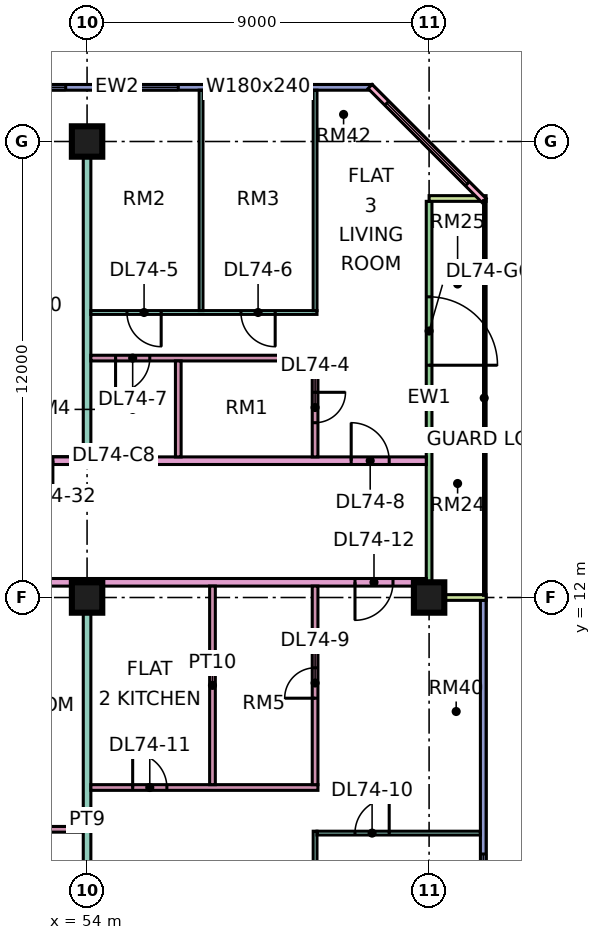
"""IFC4 building model, lengths in metres.
Left out: names, types, materials, properties, quantities, classifications, styles, units other than length and angle.
Written with IfcOpenShell. Run it as: python <this file> out.ifc"""

import sys

from ifc_helpers import new_model, si_unit, direction, frame, frame_2d, origin, origin_2d, place, context, subcontext, project, spatial, rectangle, extrude, element, fill, save


model = new_model("IFC4")
c1 = context("Model", 3, precision=1e-05, world=origin(), true_north=direction((0.0, 1.0)))
c2 = subcontext(c1, "Body", "Model", "MODEL_VIEW")
j1 = project(units=[si_unit("LENGTHUNIT", "METRE"), si_unit("PLANEANGLEUNIT", "RADIAN")], contexts=[c1])
p1 = place(None, origin())
s1 = spatial("IfcSite", under=j1, at=p1, CompositionType="ELEMENT")
p2 = place(p1, origin())
s2 = spatial("IfcBuilding", under=s1, at=p2, CompositionType="ELEMENT")
p3 = place(p2, frame((0.0, 0.0, 314.65)))
s3 = spatial("IfcBuildingStorey", under=s2, at=p3, CompositionType="ELEMENT", Elevation=314.65)
for number, where, z_axis, x_axis in (
    (1, (54.0, 12.0, 0.0), (0.0, 0.0, 1.0), (1.0, 0.0, 0.0)),
    (2, (54.0, 24.0, 0.0), (0.0, 0.0, 1.0), (1.0, 0.0, 0.0)),
    (3, (63.0, 12.0, 0.0), (0.0, 0.0, 1.0), (1.0, 0.0, 0.0)),
):
    element("IfcColumn", number, at=place(p3, frame(where, z_axis=z_axis, x_axis=x_axis)), inside=s3, PredefinedType="COLUMN", context=c2, shape_type="SweptSolid", body=[
        extrude(rectangle(XDim=0.8, YDim=0.8, at=origin_2d()), origin(), (0.0, 0.0, 1.0), 3.75),
    ])
p4 = place(p3, frame((61.5, 25.425, 0.0), z_axis=(0.0, 0.0, 1.0), x_axis=(-1.0, 0.0, 0.0)))
e4 = element("IfcWall", 4, at=p4, inside=s3, PredefinedType="SOLIDWALL", context=c2, shape_type="SweptSolid", body=[
    extrude(rectangle(XDim=13.425, YDim=0.15, at=frame_2d((6.712, 0.0))), origin(), (0.0, 0.0, 1.0), 3.35),
])
p5 = place(p4, frame((2.1, 0.0, 0.45)))
e5 = element("IfcOpeningElement", 5, at=p5, cuts=e4, PredefinedType="OPENING", context=c2, shape_type="SweptSolid", body=[
    extrude(rectangle(XDim=1.8, YDim=2.4, at=frame_2d((0.9, 1.2))), frame((0.0, 0.085, 0.0), z_axis=(0.0, -1.0, 0.0), x_axis=(1.0, 0.0, 0.0)), (0.0, 0.0, 1.0), 0.17),
])
p6 = place(p4, frame((5.1, 0.0, 0.45)))
e6 = element("IfcOpeningElement", 6, at=p6, cuts=e4, PredefinedType="OPENING", context=c2, shape_type="SweptSolid", body=[
    extrude(rectangle(XDim=1.8, YDim=2.4, at=frame_2d((0.9, 1.2))), frame((0.0, 0.085, 0.0), z_axis=(0.0, -1.0, 0.0), x_axis=(1.0, 0.0, 0.0)), (0.0, 0.0, 1.0), 0.17),
])
p7 = place(p4, frame((8.062, 0.0, 0.45)))
e7 = element("IfcOpeningElement", 7, at=p7, cuts=e4, PredefinedType="OPENING", context=c2, shape_type="SweptSolid", body=[
    extrude(rectangle(XDim=4.8, YDim=2.4, at=frame_2d((2.4, 1.2))), frame((0.0, 0.085, 0.0), z_axis=(0.0, -1.0, 0.0), x_axis=(1.0, 0.0, 0.0)), (0.0, 0.0, 1.0), 0.17),
])
p8 = place(p3, frame((64.425, 1.5, 0.0), z_axis=(0.0, 0.0, 1.0), x_axis=(0.0, 1.0, 0.0)))
e8 = element("IfcWall", 8, at=p8, inside=s3, PredefinedType="SOLIDWALL", context=c2, shape_type="SweptSolid", body=[
    extrude(rectangle(XDim=10.425, YDim=0.15, at=frame_2d((5.212, 0.0))), origin(), (0.0, 0.0, 1.0), 3.35),
])
p9 = place(p8, frame((0.75, 0.0, 0.45)))
e9 = element("IfcOpeningElement", 9, at=p9, cuts=e8, PredefinedType="OPENING", context=c2, shape_type="SweptSolid", body=[
    extrude(rectangle(XDim=3.0, YDim=2.4, at=frame_2d((1.5, 1.2))), frame((0.0, 0.085, 0.0), z_axis=(0.0, -1.0, 0.0), x_axis=(1.0, 0.0, 0.0)), (0.0, 0.0, 1.0), 0.17),
])
p10 = place(p3, frame((63.0, 12.075, 0.0), z_axis=(0.0, 0.0, 1.0), x_axis=(0.0, 1.0, 0.0)))
e10 = element("IfcWall", 10, at=p10, inside=s3, PredefinedType="SOLIDWALL", context=c2, shape_type="SweptSolid", body=[
    extrude(rectangle(XDim=10.35, YDim=0.15, at=frame_2d((5.175, 0.0))), origin(), (0.0, 0.0, 1.0), 3.35),
])
p11 = place(p10, frame((6.038, 0.0, 0.0)))
e11 = element("IfcOpeningElement", 11, at=p11, cuts=e10, PredefinedType="OPENING", context=c2, shape_type="SweptSolid", body=[
    extrude(rectangle(XDim=1.8, YDim=2.4, at=frame_2d((0.9, 1.2))), frame((0.0, 0.085, 0.0), z_axis=(0.0, -1.0, 0.0), x_axis=(1.0, 0.0, 0.0)), (0.0, 0.0, 1.0), 0.17),
])
for number, where, z_axis, x_axis in (
    (12, (64.5, 12.0, 0.0), (0.0, 0.0, 1.0), (-1.0, 0.0, 0.0)),
    (13, (64.5, 22.5, 0.0), (0.0, 0.0, 1.0), (-1.0, 0.0, 0.0)),
):
    element("IfcWall", number, at=place(p3, frame(where, z_axis=z_axis, x_axis=x_axis)), inside=s3, PredefinedType="SOLIDWALL", context=c2, shape_type="SweptSolid", body=[
        extrude(rectangle(XDim=1.5, YDim=0.15, at=frame_2d((0.75, 0.0))), origin(), (0.0, 0.0, 1.0), 3.35),
    ])
p12 = place(p3, frame((64.447, 22.447, 0.0), z_axis=(0.0, 0.0, 1.0), x_axis=(-0.707106781187, 0.707106781187, 0.0)))
e14 = element("IfcWall", 14, at=p12, inside=s3, PredefinedType="SOLIDWALL", context=c2, shape_type="SweptSolid", body=[
    extrude(rectangle(XDim=4.243, YDim=0.15, at=frame_2d((2.121, 0.0))), origin(), (0.0, 0.0, 1.0), 3.35),
])
p13 = place(p12, frame((0.621, 0.0, 0.45)))
e15 = element("IfcOpeningElement", 15, at=p13, cuts=e14, PredefinedType="OPENING", context=c2, shape_type="SweptSolid", body=[
    extrude(rectangle(XDim=3.0, YDim=2.4, at=frame_2d((1.5, 1.2))), frame((0.0, 0.085, 0.0), z_axis=(0.0, -1.0, 0.0), x_axis=(1.0, 0.0, 0.0)), (0.0, 0.0, 1.0), 0.17),
])
p14 = place(p3, frame((40.65, 12.4, 0.0), z_axis=(0.0, 0.0, 1.0), x_axis=(1.0, 0.0, 0.0)))
e16 = element("IfcWall", 16, at=p14, inside=s3, PredefinedType="PARTITIONING", context=c2, shape_type="SweptSolid", body=[
    extrude(rectangle(XDim=22.276, YDim=0.2, at=frame_2d((11.138, 0.0))), origin(), (0.0, 0.0, 1.0), 3.35),
])
p15 = place(p14, frame((20.4, 0.0, 0.0)))
e17 = element("IfcOpeningElement", 17, at=p15, cuts=e16, PredefinedType="OPENING", context=c2, shape_type="SweptSolid", body=[
    extrude(rectangle(XDim=1.0, YDim=2.1, at=frame_2d((0.5, 1.05))), frame((0.0, 0.11, 0.0), z_axis=(0.0, -1.0, 0.0), x_axis=(1.0, 0.0, 0.0)), (0.0, 0.0, 1.0), 0.22),
])
p16 = place(p14, frame((1.05, 0.0, 0.0)))
e18 = element("IfcOpeningElement", 18, at=p16, cuts=e16, PredefinedType="OPENING", context=c2, shape_type="SweptSolid", body=[
    extrude(rectangle(XDim=1.0, YDim=2.1, at=frame_2d((0.5, 1.05))), frame((0.0, 0.11, 0.0), z_axis=(0.0, -1.0, 0.0), x_axis=(1.0, 0.0, 0.0)), (0.0, 0.0, 1.0), 0.22),
])
p17 = place(p3, frame((43.575, 5.9, 0.0), z_axis=(0.0, 0.0, 1.0), x_axis=(1.0, 0.0, 0.0)))
e19 = element("IfcWall", 19, at=p17, inside=s3, PredefinedType="PARTITIONING", context=c2, shape_type="SweptSolid", body=[
    extrude(rectangle(XDim=10.325, YDim=0.15, at=frame_2d((5.163, 0.0))), origin(), (0.0, 0.0, 1.0), 3.35),
])
p18 = place(p17, frame((1.825, 0.0, 0.0)))
e20 = element("IfcOpeningElement", 20, at=p18, cuts=e19, PredefinedType="OPENING", context=c2, shape_type="SweptSolid", body=[
    extrude(rectangle(XDim=0.8, YDim=2.1, at=frame_2d((0.4, 1.05))), frame((0.0, 0.085, 0.0), z_axis=(0.0, -1.0, 0.0), x_axis=(1.0, 0.0, 0.0)), (0.0, 0.0, 1.0), 0.17),
])
p19 = place(p17, frame((6.975, 0.0, 0.0)))
e21 = element("IfcOpeningElement", 21, at=p19, cuts=e19, PredefinedType="OPENING", context=c2, shape_type="SweptSolid", body=[
    extrude(rectangle(XDim=0.9, YDim=2.1, at=frame_2d((0.45, 1.05))), frame((0.0, 0.085, 0.0), z_axis=(0.0, -1.0, 0.0), x_axis=(1.0, 0.0, 0.0)), (0.0, 0.0, 1.0), 0.17),
])
p20 = place(p3, frame((51.225, 15.6, 0.0), z_axis=(0.0, 0.0, 1.0), x_axis=(1.0, 0.0, 0.0)))
e22 = element("IfcWall", 22, at=p20, inside=s3, PredefinedType="PARTITIONING", context=c2, shape_type="SweptSolid", body=[
    extrude(rectangle(XDim=11.701, YDim=0.2, at=frame_2d((5.851, 0.0))), origin(), (0.0, 0.0, 1.0), 3.35),
])
p21 = place(p20, frame((9.725, 0.0, 0.0)))
e23 = element("IfcOpeningElement", 23, at=p21, cuts=e22, PredefinedType="OPENING", context=c2, shape_type="SweptSolid", body=[
    extrude(rectangle(XDim=1.0, YDim=2.1, at=frame_2d((0.5, 1.05))), frame((0.0, 0.11, 0.0), z_axis=(0.0, -1.0, 0.0), x_axis=(1.0, 0.0, 0.0)), (0.0, 0.0, 1.0), 0.22),
])
p22 = place(p20, frame((0.875, 0.0, 0.0)))
e24 = element("IfcOpeningElement", 24, at=p22, cuts=e22, PredefinedType="OPENING", context=c2, shape_type="SweptSolid", body=[
    extrude(rectangle(XDim=1.0, YDim=2.1, at=frame_2d((0.5, 1.05))), frame((0.0, 0.11, 0.0), z_axis=(0.0, -1.0, 0.0), x_axis=(1.0, 0.0, 0.0)), (0.0, 0.0, 1.0), 0.22),
])
p23 = place(p3, frame((54.0, 0.0, 0.0), z_axis=(0.0, 0.0, 1.0), x_axis=(0.0, 1.0, 0.0)))
e25 = element("IfcWall", 25, at=p23, inside=s3, PredefinedType="PARTITIONING", context=c2, shape_type="SweptSolid", body=[
    extrude(rectangle(XDim=12.3, YDim=0.2, at=frame_2d((6.15, 0.0))), origin(), (0.0, 0.0, 1.0), 3.35),
])
p24 = place(p3, frame((54.0, 15.7, 0.0), z_axis=(0.0, 0.0, 1.0), x_axis=(0.0, 1.0, 0.0)))
e26 = element("IfcWall", 26, at=p24, inside=s3, PredefinedType="PARTITIONING", context=c2, shape_type="SweptSolid", body=[
    extrude(rectangle(XDim=8.3, YDim=0.2, at=frame_2d((4.15, 0.0))), origin(), (0.0, 0.0, 1.0), 3.35),
])
p25 = place(p3, frame((54.1, 7.0, 0.0), z_axis=(0.0, 0.0, 1.0), x_axis=(1.0, 0.0, 0.0)))
e27 = element("IfcWall", 27, at=p25, inside=s3, PredefinedType="PARTITIONING", context=c2, shape_type="SweptSolid", body=[
    extrude(rectangle(XDim=5.975, YDim=0.15, at=frame_2d((2.987, 0.0))), origin(), (0.0, 0.0, 1.0), 3.35),
])
p26 = place(p25, frame((1.1, 0.0, 0.0)))
e28 = element("IfcOpeningElement", 28, at=p26, cuts=e27, PredefinedType="OPENING", context=c2, shape_type="SweptSolid", body=[
    extrude(rectangle(XDim=0.9, YDim=2.1, at=frame_2d((0.45, 1.05))), frame((0.0, 0.085, 0.0), z_axis=(0.0, -1.0, 0.0), x_axis=(1.0, 0.0, 0.0)), (0.0, 0.0, 1.0), 0.17),
])
p27 = place(p3, frame((54.1, 18.3, 0.0), z_axis=(0.0, 0.0, 1.0), x_axis=(1.0, 0.0, 0.0)))
e29 = element("IfcWall", 29, at=p27, inside=s3, PredefinedType="PARTITIONING", context=c2, shape_type="SweptSolid", body=[
    extrude(rectangle(XDim=5.975, YDim=0.15, at=frame_2d((2.987, 0.0))), origin(), (0.0, 0.0, 1.0), 3.35),
])
p28 = place(p27, frame((0.65, 0.0, 0.0)))
e30 = element("IfcOpeningElement", 30, at=p28, cuts=e29, PredefinedType="OPENING", context=c2, shape_type="SweptSolid", body=[
    extrude(rectangle(XDim=0.9, YDim=2.1, at=frame_2d((0.45, 1.05))), frame((0.0, 0.085, 0.0), z_axis=(0.0, -1.0, 0.0), x_axis=(1.0, 0.0, 0.0)), (0.0, 0.0, 1.0), 0.17),
])
p29 = place(p3, frame((54.1, 19.5, 0.0), z_axis=(0.0, 0.0, 1.0), x_axis=(1.0, 0.0, 0.0)))
e31 = element("IfcWall", 31, at=p29, inside=s3, PredefinedType="PARTITIONING", context=c2, shape_type="SweptSolid", body=[
    extrude(rectangle(XDim=5.95, YDim=0.1, at=frame_2d((2.975, 0.0))), origin(), (0.0, 0.0, 1.0), 3.35),
])
p30 = place(p29, frame((0.95, 0.0, 0.0)))
e32 = element("IfcOpeningElement", 32, at=p30, cuts=e31, PredefinedType="OPENING", context=c2, shape_type="SweptSolid", body=[
    extrude(rectangle(XDim=0.9, YDim=2.1, at=frame_2d((0.45, 1.05))), frame((0.0, 0.06, 0.0), z_axis=(0.0, -1.0, 0.0), x_axis=(1.0, 0.0, 0.0)), (0.0, 0.0, 1.0), 0.12),
])
p31 = place(p29, frame((3.95, 0.0, 0.0)))
e33 = element("IfcOpeningElement", 33, at=p31, cuts=e31, PredefinedType="OPENING", context=c2, shape_type="SweptSolid", body=[
    extrude(rectangle(XDim=0.9, YDim=2.1, at=frame_2d((0.45, 1.05))), frame((0.0, 0.06, 0.0), z_axis=(0.0, -1.0, 0.0), x_axis=(1.0, 0.0, 0.0)), (0.0, 0.0, 1.0), 0.12),
])
p32 = place(p3, frame((56.4, 15.7, 0.0), z_axis=(0.0, 0.0, 1.0), x_axis=(0.0, 1.0, 0.0)))
e34 = element("IfcWall", 34, at=p32, inside=s3, PredefinedType="PARTITIONING", context=c2, shape_type="SweptSolid", body=[
    extrude(rectangle(XDim=2.525, YDim=0.15, at=frame_2d((1.263, 0.0))), origin(), (0.0, 0.0, 1.0), 3.35),
])
p33 = place(p3, frame((57.0, 19.55, 0.0), z_axis=(0.0, 0.0, 1.0), x_axis=(0.0, 1.0, 0.0)))
e35 = element("IfcWall", 35, at=p33, inside=s3, PredefinedType="PARTITIONING", context=c2, shape_type="SweptSolid", body=[
    extrude(rectangle(XDim=5.801, YDim=0.1, at=frame_2d((2.9, 0.0))), origin(), (0.0, 0.0, 1.0), 3.35),
])
p34 = place(p3, frame((57.3, 7.075, 0.0), z_axis=(0.0, 0.0, 1.0), x_axis=(0.0, 1.0, 0.0)))
e36 = element("IfcWall", 36, at=p34, inside=s3, PredefinedType="PARTITIONING", context=c2, shape_type="SweptSolid", body=[
    extrude(rectangle(XDim=5.225, YDim=0.15, at=frame_2d((2.613, 0.0))), origin(), (0.0, 0.0, 1.0), 3.35),
])
p35 = place(p3, frame((60.0, -1.35, 0.0), z_axis=(0.0, 0.0, 1.0), x_axis=(0.0, 1.0, 0.0)))
e37 = element("IfcWall", 37, at=p35, inside=s3, PredefinedType="PARTITIONING", context=c2, shape_type="SweptSolid", body=[
    extrude(rectangle(XDim=7.2, YDim=0.1, at=frame_2d((3.6, 0.0))), origin(), (0.0, 0.0, 1.0), 3.35),
])
p36 = place(p3, frame((60.0, 7.075, 0.0), z_axis=(0.0, 0.0, 1.0), x_axis=(0.0, 1.0, 0.0)))
e38 = element("IfcWall", 38, at=p36, inside=s3, PredefinedType="PARTITIONING", context=c2, shape_type="SweptSolid", body=[
    extrude(rectangle(XDim=5.225, YDim=0.15, at=frame_2d((2.613, 0.0))), origin(), (0.0, 0.0, 1.0), 3.35),
])
p37 = place(p36, frame((2.275, 0.0, 0.0)))
e39 = element("IfcOpeningElement", 39, at=p37, cuts=e38, PredefinedType="OPENING", context=c2, shape_type="SweptSolid", body=[
    extrude(rectangle(XDim=0.8, YDim=2.1, at=frame_2d((0.4, 1.05))), frame((0.0, 0.085, 0.0), z_axis=(0.0, -1.0, 0.0), x_axis=(1.0, 0.0, 0.0)), (0.0, 0.0, 1.0), 0.17),
])
p38 = place(p3, frame((60.0, 15.7, 0.0), z_axis=(0.0, 0.0, 1.0), x_axis=(0.0, 1.0, 0.0)))
e40 = element("IfcWall", 40, at=p38, inside=s3, PredefinedType="PARTITIONING", context=c2, shape_type="SweptSolid", body=[
    extrude(rectangle(XDim=2.525, YDim=0.15, at=frame_2d((1.263, 0.0))), origin(), (0.0, 0.0, 1.0), 3.35),
])
p39 = place(p38, frame((0.9, 0.0, 0.0)))
e41 = element("IfcOpeningElement", 41, at=p39, cuts=e40, PredefinedType="OPENING", context=c2, shape_type="SweptSolid", body=[
    extrude(rectangle(XDim=0.8, YDim=2.1, at=frame_2d((0.4, 1.05))), frame((0.0, 0.085, 0.0), z_axis=(0.0, -1.0, 0.0), x_axis=(1.0, 0.0, 0.0)), (0.0, 0.0, 1.0), 0.17),
])
p40 = place(p3, frame((60.0, 19.55, 0.0), z_axis=(0.0, 0.0, 1.0), x_axis=(0.0, 1.0, 0.0)))
e42 = element("IfcWall", 42, at=p40, inside=s3, PredefinedType="PARTITIONING", context=c2, shape_type="SweptSolid", body=[
    extrude(rectangle(XDim=5.8, YDim=0.1, at=frame_2d((2.9, 0.0))), origin(), (0.0, 0.0, 1.0), 3.35),
])
p41 = place(p3, frame((60.05, 5.8, 0.0), z_axis=(0.0, 0.0, 1.0), x_axis=(1.0, 0.0, 0.0)))
e43 = element("IfcWall", 43, at=p41, inside=s3, PredefinedType="PARTITIONING", context=c2, shape_type="SweptSolid", body=[
    extrude(rectangle(XDim=4.3, YDim=0.1, at=frame_2d((2.15, 0.0))), origin(), (0.0, 0.0, 1.0), 3.35),
])
p42 = place(p41, frame((1.0, 0.0, 0.0)))
e44 = element("IfcOpeningElement", 44, at=p42, cuts=e43, PredefinedType="OPENING", context=c2, shape_type="SweptSolid", body=[
    extrude(rectangle(XDim=0.9, YDim=2.1, at=frame_2d((0.45, 1.05))), frame((0.0, 0.06, 0.0), z_axis=(0.0, -1.0, 0.0), x_axis=(1.0, 0.0, 0.0)), (0.0, 0.0, 1.0), 0.12),
])
p43 = place(p5, origin())
e45 = element("IfcWindow", 45, at=p43, inside=s3, PartitioningType="SINGLE_PANEL", PredefinedType="WINDOW", context=c2, shape_type="SweptSolid", body=[
    extrude(rectangle(XDim=1.8, YDim=2.4, at=frame_2d((0.9, 1.2))), frame((0.0, 0.03, 0.0), z_axis=(0.0, -1.0, 0.0), x_axis=(1.0, 0.0, 0.0)), (0.0, 0.0, 1.0), 0.06),
])
fill(e5, e45)
p44 = place(p6, origin())
e46 = element("IfcWindow", 46, at=p44, inside=s3, PartitioningType="SINGLE_PANEL", PredefinedType="WINDOW", context=c2, shape_type="SweptSolid", body=[
    extrude(rectangle(XDim=1.8, YDim=2.4, at=frame_2d((0.9, 1.2))), frame((0.0, 0.03, 0.0), z_axis=(0.0, -1.0, 0.0), x_axis=(1.0, 0.0, 0.0)), (0.0, 0.0, 1.0), 0.06),
])
fill(e6, e46)
p45 = place(p7, origin())
e47 = element("IfcWindow", 47, at=p45, inside=s3, PartitioningType="SINGLE_PANEL", PredefinedType="WINDOW", context=c2, shape_type="SweptSolid", body=[
    extrude(rectangle(XDim=4.8, YDim=2.4, at=frame_2d((2.4, 1.2))), frame((0.0, 0.03, 0.0), z_axis=(0.0, -1.0, 0.0), x_axis=(1.0, 0.0, 0.0)), (0.0, 0.0, 1.0), 0.06),
])
fill(e7, e47)
p46 = place(p9, origin())
e48 = element("IfcWindow", 48, at=p46, inside=s3, PartitioningType="SINGLE_PANEL", PredefinedType="WINDOW", context=c2, shape_type="SweptSolid", body=[
    extrude(rectangle(XDim=3.0, YDim=2.4, at=frame_2d((1.5, 1.2))), frame((0.0, 0.03, 0.0), z_axis=(0.0, -1.0, 0.0), x_axis=(1.0, 0.0, 0.0)), (0.0, 0.0, 1.0), 0.06),
])
fill(e9, e48)
p47 = place(p11, frame((1.8, 0.0, 0.0), z_axis=(0.0, 0.0, 1.0), x_axis=(-1.0, 0.0, 0.0)))
e49 = element("IfcDoor", 49, at=p47, inside=s3, OperationType="DOUBLE_DOOR_SINGLE_SWING", PredefinedType="DOOR", context=c2, shape_type="SweptSolid", body=[
    extrude(rectangle(XDim=1.8, YDim=2.4, at=frame_2d((0.9, 1.2))), frame((0.0, 0.025, 0.0), z_axis=(0.0, -1.0, 0.0), x_axis=(1.0, 0.0, 0.0)), (0.0, 0.0, 1.0), 0.05),
])
fill(e11, e49)
p48 = place(p13, origin())
e50 = element("IfcWindow", 50, at=p48, inside=s3, PartitioningType="SINGLE_PANEL", PredefinedType="WINDOW", context=c2, shape_type="SweptSolid", body=[
    extrude(rectangle(XDim=3.0, YDim=2.4, at=frame_2d((1.5, 1.2))), frame((0.0, 0.03, 0.0), z_axis=(0.0, -1.0, 0.0), x_axis=(1.0, 0.0, 0.0)), (0.0, 0.0, 1.0), 0.06),
])
fill(e15, e50)
p49 = place(p39, origin())
e51 = element("IfcDoor", 51, at=p49, inside=s3, OperationType="SINGLE_SWING_RIGHT", PredefinedType="DOOR", context=c2, shape_type="SweptSolid", body=[
    extrude(rectangle(XDim=0.8, YDim=2.1, at=frame_2d((0.4, 1.05))), frame((0.0, 0.025, 0.0), z_axis=(0.0, -1.0, 0.0), x_axis=(1.0, 0.0, 0.0)), (0.0, 0.0, 1.0), 0.05),
])
fill(e41, e51)
p50 = place(p30, origin())
e52 = element("IfcDoor", 52, at=p50, inside=s3, OperationType="SINGLE_SWING_RIGHT", PredefinedType="DOOR", context=c2, shape_type="SweptSolid", body=[
    extrude(rectangle(XDim=0.9, YDim=2.1, at=frame_2d((0.45, 1.05))), frame((0.0, 0.025, 0.0), z_axis=(0.0, -1.0, 0.0), x_axis=(1.0, 0.0, 0.0)), (0.0, 0.0, 1.0), 0.05),
])
fill(e32, e52)
p51 = place(p31, origin())
e53 = element("IfcDoor", 53, at=p51, inside=s3, OperationType="SINGLE_SWING_RIGHT", PredefinedType="DOOR", context=c2, shape_type="SweptSolid", body=[
    extrude(rectangle(XDim=0.9, YDim=2.1, at=frame_2d((0.45, 1.05))), frame((0.0, 0.025, 0.0), z_axis=(0.0, -1.0, 0.0), x_axis=(1.0, 0.0, 0.0)), (0.0, 0.0, 1.0), 0.05),
])
fill(e33, e53)
p52 = place(p28, frame((0.9, 0.0, 0.0), z_axis=(0.0, 0.0, 1.0), x_axis=(-1.0, 0.0, 0.0)))
e54 = element("IfcDoor", 54, at=p52, inside=s3, OperationType="SINGLE_SWING_LEFT", PredefinedType="DOOR", context=c2, shape_type="SweptSolid", body=[
    extrude(rectangle(XDim=0.9, YDim=2.1, at=frame_2d((0.45, 1.05))), frame((0.0, 0.025, 0.0), z_axis=(0.0, -1.0, 0.0), x_axis=(1.0, 0.0, 0.0)), (0.0, 0.0, 1.0), 0.05),
])
fill(e30, e54)
p53 = place(p21, origin())
e55 = element("IfcDoor", 55, at=p53, inside=s3, OperationType="SINGLE_SWING_LEFT", PredefinedType="DOOR", context=c2, shape_type="SweptSolid", body=[
    extrude(rectangle(XDim=1.0, YDim=2.1, at=frame_2d((0.5, 1.05))), frame((0.0, 0.025, 0.0), z_axis=(0.0, -1.0, 0.0), x_axis=(1.0, 0.0, 0.0)), (0.0, 0.0, 1.0), 0.05),
])
fill(e23, e55)
p54 = place(p37, origin())
e56 = element("IfcDoor", 56, at=p54, inside=s3, OperationType="SINGLE_SWING_LEFT", PredefinedType="DOOR", context=c2, shape_type="SweptSolid", body=[
    extrude(rectangle(XDim=0.8, YDim=2.1, at=frame_2d((0.4, 1.05))), frame((0.0, 0.025, 0.0), z_axis=(0.0, -1.0, 0.0), x_axis=(1.0, 0.0, 0.0)), (0.0, 0.0, 1.0), 0.05),
])
fill(e39, e56)
p55 = place(p42, frame((0.9, 0.0, 0.0), z_axis=(0.0, 0.0, 1.0), x_axis=(-1.0, 0.0, 0.0)))
e57 = element("IfcDoor", 57, at=p55, inside=s3, OperationType="SINGLE_SWING_RIGHT", PredefinedType="DOOR", context=c2, shape_type="SweptSolid", body=[
    extrude(rectangle(XDim=0.9, YDim=2.1, at=frame_2d((0.45, 1.05))), frame((0.0, 0.025, 0.0), z_axis=(0.0, -1.0, 0.0), x_axis=(1.0, 0.0, 0.0)), (0.0, 0.0, 1.0), 0.05),
])
fill(e44, e57)
p56 = place(p26, origin())
e58 = element("IfcDoor", 58, at=p56, inside=s3, OperationType="SINGLE_SWING_LEFT", PredefinedType="DOOR", context=c2, shape_type="SweptSolid", body=[
    extrude(rectangle(XDim=0.9, YDim=2.1, at=frame_2d((0.45, 1.05))), frame((0.0, 0.025, 0.0), z_axis=(0.0, -1.0, 0.0), x_axis=(1.0, 0.0, 0.0)), (0.0, 0.0, 1.0), 0.05),
])
fill(e28, e58)
p57 = place(p15, frame((1.0, 0.0, 0.0), z_axis=(0.0, 0.0, 1.0), x_axis=(-1.0, 0.0, 0.0)))
e59 = element("IfcDoor", 59, at=p57, inside=s3, OperationType="SINGLE_SWING_LEFT", PredefinedType="DOOR", context=c2, shape_type="SweptSolid", body=[
    extrude(rectangle(XDim=1.0, YDim=2.1, at=frame_2d((0.5, 1.05))), frame((0.0, 0.025, 0.0), z_axis=(0.0, -1.0, 0.0), x_axis=(1.0, 0.0, 0.0)), (0.0, 0.0, 1.0), 0.05),
])
fill(e17, e59)
p58 = place(p22, origin())
e60 = element("IfcDoor", 60, at=p58, inside=s3, OperationType="SINGLE_SWING_RIGHT", PredefinedType="DOOR", context=c2, shape_type="SweptSolid", body=[
    extrude(rectangle(XDim=1.0, YDim=2.1, at=frame_2d((0.5, 1.05))), frame((0.0, 0.025, 0.0), z_axis=(0.0, -1.0, 0.0), x_axis=(1.0, 0.0, 0.0)), (0.0, 0.0, 1.0), 0.05),
])
fill(e24, e60)
save(model, sys.argv[1])
